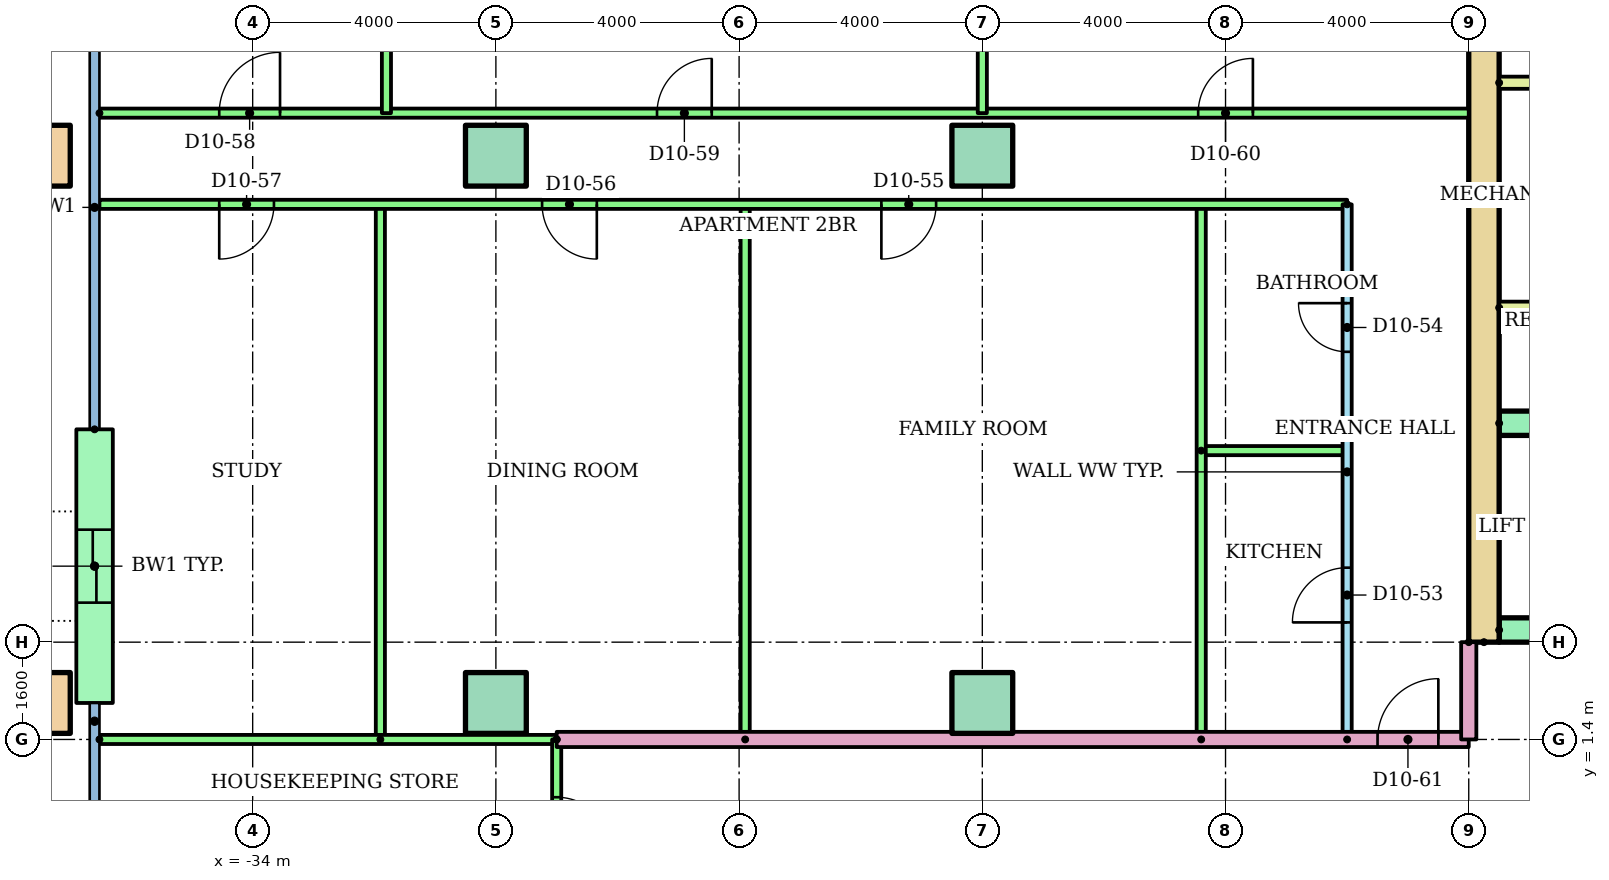
"""IFC4 building model, lengths in metres.
Left out: names, types, materials, properties, quantities, classifications, styles, units other than length and angle.
Written with IfcOpenShell. Run it as: python <this file> out.ifc"""

import sys

from ifc_helpers import new_model, si_unit, direction, frame, frame_2d, origin, origin_2d, place, context, subcontext, project, spatial, rectangle, hollow_rectangle, extrude, element, fill, save


model = new_model("IFC4")
c1 = context("Model", 3, precision=1e-05, world=origin(), true_north=direction((0.0, 1.0)))
c2 = subcontext(c1, "Body", "Model", "MODEL_VIEW")
j1 = project(units=[si_unit("LENGTHUNIT", "METRE"), si_unit("PLANEANGLEUNIT", "RADIAN")], contexts=[c1])
p1 = place(None, origin())
s1 = spatial("IfcSite", under=j1, at=p1, CompositionType="ELEMENT")
p2 = place(p1, origin())
s2 = spatial("IfcBuilding", under=s1, at=p2, CompositionType="ELEMENT")
p3 = place(p2, frame((0.0, 0.0, 41.6)))
s3 = spatial("IfcBuildingStorey", under=s2, at=p3, CompositionType="ELEMENT", Elevation=41.6)
p4 = place(p3, frame((-37.5, 2.0, 0.0)))
e1 = element("IfcColumn", 1, at=p4, inside=s3, PredefinedType="COLUMN", context=c2, shape_type="SweptSolid", body=[
    extrude(hollow_rectangle(XDim=1.0, YDim=1.0, WallThickness=0.05, at=origin_2d()), origin(), (0.0, 0.0, 1.0), 3.2),
])
for number, where in (
    (2, (-30.0, 2.0, 0.0)),
    (3, (-22.0, 2.0, 0.0)),
):
    element("IfcColumn", number, at=place(p3, frame(where)), inside=s3, PredefinedType="COLUMN", context=c2, shape_type="SweptSolid", body=[
        extrude(rectangle(XDim=1.0, YDim=1.0, at=origin_2d()), origin(), (0.0, 0.0, 1.0), 3.2),
    ])
p5 = place(p3, frame((-37.5, 11.0, 0.0)))
e4 = element("IfcColumn", 4, at=p5, inside=s3, PredefinedType="COLUMN", context=c2, shape_type="SweptSolid", body=[
    extrude(hollow_rectangle(XDim=1.0, YDim=1.0, WallThickness=0.05, at=origin_2d()), origin(), (0.0, 0.0, 1.0), 3.2),
])
for number, where in (
    (5, (-30.0, 11.0, 0.0)),
    (6, (-22.0, 11.0, 0.0)),
):
    element("IfcColumn", number, at=place(p3, frame(where)), inside=s3, PredefinedType="COLUMN", context=c2, shape_type="SweptSolid", body=[
        extrude(rectangle(XDim=1.0, YDim=1.0, at=origin_2d()), origin(), (0.0, 0.0, 1.0), 3.2),
    ])
p6 = place(p3, frame((-36.6, 6.5, 0.0), z_axis=(0.0, 0.0, 1.0), x_axis=(0.0, -1.0, 0.0)))
e7 = element("IfcWall", 7, at=p6, inside=s3, PredefinedType="STANDARD", context=c2, shape_type="SweptSolid", body=[
    extrude(rectangle(XDim=4.5, YDim=0.6, at=frame_2d((2.25, 0.0))), origin(), (0.0, 0.0, 1.0), 2.92),
])
p7 = place(p6, frame((1.65, 0.0, 0.0)))
e8 = element("IfcOpeningElement", 8, at=p7, cuts=e7, PredefinedType="OPENING", context=c2, shape_type="SweptSolid", body=[
    extrude(rectangle(XDim=1.2, YDim=2.1, at=frame_2d((0.6, 1.05))), frame((0.0, 0.31, 0.0), z_axis=(0.0, -1.0, 0.0), x_axis=(1.0, 0.0, 0.0)), (0.0, 0.0, 1.0), 0.62),
])
p8 = place(p3, frame((-13.75, 3.0, 0.0), z_axis=(0.0, 0.0, 1.0), x_axis=(0.0, 1.0, 0.0)))
e9 = element("IfcWall", 9, at=p8, inside=s3, PredefinedType="SHEAR", context=c2, shape_type="SweptSolid", body=[
    extrude(rectangle(XDim=17.0, YDim=0.5, at=frame_2d((8.5, 0.0))), origin(), (0.0, 0.0, 1.0), 2.92),
])
p9 = place(p3, frame((-13.5, 3.2, 0.0)))
e10 = element("IfcWall", 10, at=p9, inside=s3, PredefinedType="SHEAR", context=c2, shape_type="SweptSolid", body=[
    extrude(rectangle(XDim=27.0, YDim=0.4, at=frame_2d((13.5, 0.0))), origin(), (0.0, 0.0, 1.0), 2.92),
])
p10 = place(p9, frame((6.861, 0.0, 0.0)))
e11 = element("IfcOpeningElement", 11, at=p10, cuts=e10, PredefinedType="OPENING", context=c2, shape_type="SweptSolid", body=[
    extrude(rectangle(XDim=1.1, YDim=2.1, at=frame_2d((0.55, 1.05))), frame((0.0, 0.21, 0.0), z_axis=(0.0, -1.0, 0.0), x_axis=(1.0, 0.0, 0.0)), (0.0, 0.0, 1.0), 0.42),
])
p11 = place(p9, frame((9.906, 0.0, 0.0)))
e12 = element("IfcOpeningElement", 12, at=p11, cuts=e10, PredefinedType="OPENING", context=c2, shape_type="SweptSolid", body=[
    extrude(rectangle(XDim=1.1, YDim=2.1, at=frame_2d((0.55, 1.05))), frame((0.0, 0.21, 0.0), z_axis=(0.0, -1.0, 0.0), x_axis=(1.0, 0.0, 0.0)), (0.0, 0.0, 1.0), 0.42),
])
p12 = place(p9, frame((15.994, 0.0, 0.0)))
e13 = element("IfcOpeningElement", 13, at=p12, cuts=e10, PredefinedType="OPENING", context=c2, shape_type="SweptSolid", body=[
    extrude(rectangle(XDim=1.1, YDim=2.1, at=frame_2d((0.55, 1.05))), frame((0.0, 0.21, 0.0), z_axis=(0.0, -1.0, 0.0), x_axis=(1.0, 0.0, 0.0)), (0.0, 0.0, 1.0), 0.42),
])
p13 = place(p9, frame((19.039, 0.0, 0.0)))
e14 = element("IfcOpeningElement", 14, at=p13, cuts=e10, PredefinedType="OPENING", context=c2, shape_type="SweptSolid", body=[
    extrude(rectangle(XDim=1.1, YDim=2.1, at=frame_2d((0.55, 1.05))), frame((0.0, 0.21, 0.0), z_axis=(0.0, -1.0, 0.0), x_axis=(1.0, 0.0, 0.0)), (0.0, 0.0, 1.0), 0.42),
])
p14 = place(p9, frame((12.6, 0.0, 0.0)))
e15 = element("IfcOpeningElement", 15, at=p14, cuts=e10, PredefinedType="OPENING", context=c2, shape_type="SweptSolid", body=[
    extrude(rectangle(XDim=1.8, YDim=2.1, at=frame_2d((0.9, 1.05))), frame((0.0, 0.21, 0.0), z_axis=(0.0, -1.0, 0.0), x_axis=(1.0, 0.0, 0.0)), (0.0, 0.0, 1.0), 0.42),
])
p15 = place(p3, frame((-13.5, 6.6, 0.0)))
e16 = element("IfcWall", 16, at=p15, inside=s3, PredefinedType="SHEAR", context=c2, shape_type="SweptSolid", body=[
    extrude(rectangle(XDim=11.978, YDim=0.4, at=frame_2d((5.989, 0.0))), origin(), (0.0, 0.0, 1.0), 2.92),
])
for number, where in (
    (17, (-13.5, 8.5, 0.0)),
    (18, (-13.5, 12.2, 0.0)),
):
    element("IfcWall", number, at=place(p3, frame(where)), inside=s3, PredefinedType="PARTITIONING", context=c2, shape_type="SweptSolid", body=[
        extrude(rectangle(XDim=3.9, YDim=0.2, at=frame_2d((1.95, 0.0))), origin(), (0.0, 0.0, 1.0), 2.92),
    ])
p16 = place(p3, frame((-16.0, 1.4, 0.0), z_axis=(0.0, 0.0, 1.0), x_axis=(0.0, 1.0, 0.0)))
e19 = element("IfcWall", 19, at=p16, inside=s3, PredefinedType="PARTITIONING", context=c2, shape_type="SweptSolid", body=[
    extrude(rectangle(XDim=8.8, YDim=0.15, at=frame_2d((4.4, 0.0))), origin(), (0.0, 0.0, 1.0), 2.4),
])
p17 = place(p16, frame((1.925, 0.0, 0.0)))
e20 = element("IfcOpeningElement", 20, at=p17, cuts=e19, PredefinedType="OPENING", context=c2, shape_type="SweptSolid", body=[
    extrude(rectangle(XDim=0.9, YDim=2.1, at=frame_2d((0.45, 1.05))), frame((0.0, 0.085, 0.0), z_axis=(0.0, -1.0, 0.0), x_axis=(1.0, 0.0, 0.0)), (0.0, 0.0, 1.0), 0.17),
])
p18 = place(p16, frame((6.375, 0.0, 0.0)))
e21 = element("IfcOpeningElement", 21, at=p18, cuts=e19, PredefinedType="OPENING", context=c2, shape_type="SweptSolid", body=[
    extrude(rectangle(XDim=0.8, YDim=2.1, at=frame_2d((0.4, 1.05))), frame((0.0, 0.085, 0.0), z_axis=(0.0, -1.0, 0.0), x_axis=(1.0, 0.0, 0.0)), (0.0, 0.0, 1.0), 0.17),
])
p19 = place(p3, frame((-18.4, 6.15, 0.0)))
e22 = element("IfcWall", 22, at=p19, inside=s3, PredefinedType="PARTITIONING", context=c2, shape_type="SweptSolid", body=[
    extrude(rectangle(XDim=2.4, YDim=0.15, at=frame_2d((1.2, 0.0))), origin(), (0.0, 0.0, 1.0), 2.4),
])
for number, where, z_axis, x_axis in (
    (23, (-18.4, 1.4, 0.0), (0.0, 0.0, 1.0), (0.0, 1.0, 0.0)),
    (24, (-25.9, 1.4, 0.0), (0.0, 0.0, 1.0), (0.0, 1.0, 0.0)),
    (25, (-31.9, 1.4, 0.0), (0.0, 0.0, 1.0), (0.0, 1.0, 0.0)),
):
    element("IfcWall", number, at=place(p3, frame(where, z_axis=z_axis, x_axis=x_axis)), inside=s3, PredefinedType="PARTITIONING", context=c2, shape_type="SweptSolid", body=[
        extrude(rectangle(XDim=8.8, YDim=0.15, at=frame_2d((4.4, 0.0))), origin(), (0.0, 0.0, 1.0), 2.4),
    ])
p20 = place(p3, frame((-16.0, 10.2, 0.0), z_axis=(0.0, 0.0, 1.0), x_axis=(-1.0, 0.0, 0.0)))
e26 = element("IfcWall", 26, at=p20, inside=s3, PredefinedType="PARTITIONING", context=c2, shape_type="SweptSolid", body=[
    extrude(rectangle(XDim=20.52, YDim=0.15, at=frame_2d((10.26, 0.0))), origin(), (0.0, 0.0, 1.0), 2.4),
])
p21 = place(p20, frame((6.76, 0.0, 0.0)))
e27 = element("IfcOpeningElement", 27, at=p21, cuts=e26, PredefinedType="OPENING", context=c2, shape_type="SweptSolid", body=[
    extrude(rectangle(XDim=0.9, YDim=2.1, at=frame_2d((0.45, 1.05))), frame((0.0, 0.085, 0.0), z_axis=(0.0, -1.0, 0.0), x_axis=(1.0, 0.0, 0.0)), (0.0, 0.0, 1.0), 0.17),
])
p22 = place(p20, frame((12.34, 0.0, 0.0)))
e28 = element("IfcOpeningElement", 28, at=p22, cuts=e26, PredefinedType="OPENING", context=c2, shape_type="SweptSolid", body=[
    extrude(rectangle(XDim=0.9, YDim=2.1, at=frame_2d((0.45, 1.05))), frame((0.0, 0.085, 0.0), z_axis=(0.0, -1.0, 0.0), x_axis=(1.0, 0.0, 0.0)), (0.0, 0.0, 1.0), 0.17),
])
p23 = place(p20, frame((17.65, 0.0, 0.0)))
e29 = element("IfcOpeningElement", 29, at=p23, cuts=e26, PredefinedType="OPENING", context=c2, shape_type="SweptSolid", body=[
    extrude(rectangle(XDim=0.9, YDim=2.1, at=frame_2d((0.45, 1.05))), frame((0.0, 0.085, 0.0), z_axis=(0.0, -1.0, 0.0), x_axis=(1.0, 0.0, 0.0)), (0.0, 0.0, 1.0), 0.17),
])
p24 = place(p3, frame((-36.52, 11.7, 0.0)))
e30 = element("IfcWall", 30, at=p24, inside=s3, PredefinedType="PARTITIONING", context=c2, shape_type="SweptSolid", body=[
    extrude(rectangle(XDim=22.52, YDim=0.15, at=frame_2d((11.26, 0.0))), origin(), (0.0, 0.0, 1.0), 2.4),
])
p25 = place(p24, frame((1.97, 0.0, 0.0)))
e31 = element("IfcOpeningElement", 31, at=p25, cuts=e30, PredefinedType="OPENING", context=c2, shape_type="SweptSolid", body=[
    extrude(rectangle(XDim=1.0, YDim=2.1, at=frame_2d((0.5, 1.05))), frame((0.0, 0.085, 0.0), z_axis=(0.0, -1.0, 0.0), x_axis=(1.0, 0.0, 0.0)), (0.0, 0.0, 1.0), 0.17),
])
p26 = place(p24, frame((9.17, 0.0, 0.0)))
e32 = element("IfcOpeningElement", 32, at=p26, cuts=e30, PredefinedType="OPENING", context=c2, shape_type="SweptSolid", body=[
    extrude(rectangle(XDim=0.9, YDim=2.1, at=frame_2d((0.45, 1.05))), frame((0.0, 0.085, 0.0), z_axis=(0.0, -1.0, 0.0), x_axis=(1.0, 0.0, 0.0)), (0.0, 0.0, 1.0), 0.17),
])
p27 = place(p24, frame((18.07, 0.0, 0.0)))
e33 = element("IfcOpeningElement", 33, at=p27, cuts=e30, PredefinedType="OPENING", context=c2, shape_type="SweptSolid", body=[
    extrude(rectangle(XDim=0.9, YDim=2.1, at=frame_2d((0.45, 1.05))), frame((0.0, 0.085, 0.0), z_axis=(0.0, -1.0, 0.0), x_axis=(1.0, 0.0, 0.0)), (0.0, 0.0, 1.0), 0.17),
])
p28 = place(p3, frame((-31.8, 16.72, 0.0), z_axis=(0.0, 0.0, 1.0), x_axis=(0.0, -1.0, 0.0)))
e34 = element("IfcWall", 34, at=p28, inside=s3, PredefinedType="PARTITIONING", context=c2, shape_type="SweptSolid", body=[
    extrude(rectangle(XDim=5.02, YDim=0.15, at=frame_2d((2.51, 0.0))), origin(), (0.0, 0.0, 1.0), 2.4),
])
p29 = place(p3, frame((-22.0, 18.521, 0.0), z_axis=(0.0, 0.0, 1.0), x_axis=(0.0, -1.0, 0.0)))
e35 = element("IfcWall", 35, at=p29, inside=s3, PredefinedType="PARTITIONING", context=c2, shape_type="SweptSolid", body=[
    extrude(rectangle(XDim=6.821, YDim=0.15, at=frame_2d((3.411, 0.0))), origin(), (0.0, 0.0, 1.0), 2.4),
])
p30 = place(p3, frame((-29.0, 1.4, 0.0)))
e36 = element("IfcWall", 36, at=p30, inside=s3, PredefinedType="PARTITIONING", context=c2, shape_type="SweptSolid", body=[
    extrude(rectangle(XDim=15.0, YDim=0.25, at=frame_2d((7.5, 0.0))), origin(), (0.0, 0.0, 1.0), 2.4),
])
p31 = place(p30, frame((13.5, 0.0, 0.0)))
e37 = element("IfcOpeningElement", 37, at=p31, cuts=e36, PredefinedType="OPENING", context=c2, shape_type="SweptSolid", body=[
    extrude(rectangle(XDim=1.0, YDim=2.1, at=frame_2d((0.5, 1.05))), frame((0.0, 0.135, 0.0), z_axis=(0.0, -1.0, 0.0), x_axis=(1.0, 0.0, 0.0)), (0.0, 0.0, 1.0), 0.27),
])
p32 = place(p3, frame((-36.52, 1.4, 0.0)))
e38 = element("IfcWall", 38, at=p32, inside=s3, PredefinedType="PARTITIONING", context=c2, shape_type="SweptSolid", body=[
    extrude(rectangle(XDim=7.52, YDim=0.15, at=frame_2d((3.76, 0.0))), origin(), (0.0, 0.0, 1.0), 2.4),
])
p33 = place(p3, frame((-29.0, 1.4, 0.0), z_axis=(0.0, 0.0, 1.0), x_axis=(0.0, -1.0, 0.0)))
e39 = element("IfcWall", 39, at=p33, inside=s3, PredefinedType="PARTITIONING", context=c2, shape_type="SweptSolid", body=[
    extrude(rectangle(XDim=2.8, YDim=0.15, at=frame_2d((1.4, 0.0))), origin(), (0.0, 0.0, 1.0), 2.4),
])
p34 = place(p33, frame((0.95, 0.0, 0.0)))
e40 = element("IfcOpeningElement", 40, at=p34, cuts=e39, PredefinedType="OPENING", context=c2, shape_type="SweptSolid", body=[
    extrude(rectangle(XDim=0.9, YDim=2.1, at=frame_2d((0.45, 1.05))), frame((0.0, 0.085, 0.0), z_axis=(0.0, -1.0, 0.0), x_axis=(1.0, 0.0, 0.0)), (0.0, 0.0, 1.0), 0.17),
])
p35 = place(p3, frame((-14.0, 3.0, 0.0), z_axis=(0.0, 0.0, 1.0), x_axis=(0.0, -1.0, 0.0)))
e41 = element("IfcWall", 41, at=p35, inside=s3, PredefinedType="PARTITIONING", context=c2, shape_type="SweptSolid", body=[
    extrude(rectangle(XDim=1.6, YDim=0.25, at=frame_2d((0.8, 0.0))), origin(), (0.0, 0.0, 1.0), 2.4),
])
p36 = place(p17, origin())
e42 = element("IfcDoor", 42, at=p36, inside=s3, OperationType="SINGLE_SWING_LEFT", PredefinedType="DOOR", context=c2, shape_type="SweptSolid", body=[
    extrude(rectangle(XDim=0.9, YDim=2.1, at=frame_2d((0.45, 1.05))), frame((0.0, 0.025, 0.0), z_axis=(0.0, -1.0, 0.0), x_axis=(1.0, 0.0, 0.0)), (0.0, 0.0, 1.0), 0.05),
])
fill(e20, e42)
p37 = place(p18, origin())
e43 = element("IfcDoor", 43, at=p37, inside=s3, OperationType="SINGLE_SWING_RIGHT", PredefinedType="DOOR", context=c2, shape_type="SweptSolid", body=[
    extrude(rectangle(XDim=0.8, YDim=2.1, at=frame_2d((0.4, 1.05))), frame((0.0, 0.025, 0.0), z_axis=(0.0, -1.0, 0.0), x_axis=(1.0, 0.0, 0.0)), (0.0, 0.0, 1.0), 0.05),
])
fill(e21, e43)
p38 = place(p21, origin())
e44 = element("IfcDoor", 44, at=p38, inside=s3, OperationType="SINGLE_SWING_RIGHT", PredefinedType="DOOR", context=c2, shape_type="SweptSolid", body=[
    extrude(rectangle(XDim=0.9, YDim=2.1, at=frame_2d((0.45, 1.05))), frame((0.0, 0.025, 0.0), z_axis=(0.0, -1.0, 0.0), x_axis=(1.0, 0.0, 0.0)), (0.0, 0.0, 1.0), 0.05),
])
fill(e27, e44)
p39 = place(p22, origin())
e45 = element("IfcDoor", 45, at=p39, inside=s3, OperationType="SINGLE_SWING_LEFT", PredefinedType="DOOR", context=c2, shape_type="SweptSolid", body=[
    extrude(rectangle(XDim=0.9, YDim=2.1, at=frame_2d((0.45, 1.05))), frame((0.0, 0.025, 0.0), z_axis=(0.0, -1.0, 0.0), x_axis=(1.0, 0.0, 0.0)), (0.0, 0.0, 1.0), 0.05),
])
fill(e28, e45)
p40 = place(p23, origin())
e46 = element("IfcDoor", 46, at=p40, inside=s3, OperationType="SINGLE_SWING_RIGHT", PredefinedType="DOOR", context=c2, shape_type="SweptSolid", body=[
    extrude(rectangle(XDim=0.9, YDim=2.1, at=frame_2d((0.45, 1.05))), frame((0.0, 0.025, 0.0), z_axis=(0.0, -1.0, 0.0), x_axis=(1.0, 0.0, 0.0)), (0.0, 0.0, 1.0), 0.05),
])
fill(e29, e46)
p41 = place(p25, origin())
e47 = element("IfcDoor", 47, at=p41, inside=s3, OperationType="SINGLE_SWING_RIGHT", PredefinedType="DOOR", context=c2, shape_type="SweptSolid", body=[
    extrude(rectangle(XDim=1.0, YDim=2.1, at=frame_2d((0.5, 1.05))), frame((0.0, 0.025, 0.0), z_axis=(0.0, -1.0, 0.0), x_axis=(1.0, 0.0, 0.0)), (0.0, 0.0, 1.0), 0.05),
])
fill(e31, e47)
p42 = place(p26, origin())
e48 = element("IfcDoor", 48, at=p42, inside=s3, OperationType="SINGLE_SWING_RIGHT", PredefinedType="DOOR", context=c2, shape_type="SweptSolid", body=[
    extrude(rectangle(XDim=0.9, YDim=2.1, at=frame_2d((0.45, 1.05))), frame((0.0, 0.025, 0.0), z_axis=(0.0, -1.0, 0.0), x_axis=(1.0, 0.0, 0.0)), (0.0, 0.0, 1.0), 0.05),
])
fill(e32, e48)
p43 = place(p27, origin())
e49 = element("IfcDoor", 49, at=p43, inside=s3, OperationType="SINGLE_SWING_RIGHT", PredefinedType="DOOR", context=c2, shape_type="SweptSolid", body=[
    extrude(rectangle(XDim=0.9, YDim=2.1, at=frame_2d((0.45, 1.05))), frame((0.0, 0.025, 0.0), z_axis=(0.0, -1.0, 0.0), x_axis=(1.0, 0.0, 0.0)), (0.0, 0.0, 1.0), 0.05),
])
fill(e33, e49)
p44 = place(p31, origin())
e50 = element("IfcDoor", 50, at=p44, inside=s3, OperationType="SINGLE_SWING_RIGHT", PredefinedType="DOOR", context=c2, shape_type="SweptSolid", body=[
    extrude(rectangle(XDim=1.0, YDim=2.1, at=frame_2d((0.5, 1.05))), frame((0.0, 0.025, 0.0), z_axis=(0.0, -1.0, 0.0), x_axis=(1.0, 0.0, 0.0)), (0.0, 0.0, 1.0), 0.05),
])
fill(e37, e50)
p45 = place(p34, origin())
e51 = element("IfcDoor", 51, at=p45, inside=s3, OperationType="SINGLE_SWING_RIGHT", PredefinedType="DOOR", context=c2, shape_type="SweptSolid", body=[
    extrude(rectangle(XDim=0.9, YDim=2.1, at=frame_2d((0.45, 1.05))), frame((0.0, 0.025, 0.0), z_axis=(0.0, -1.0, 0.0), x_axis=(1.0, 0.0, 0.0)), (0.0, 0.0, 1.0), 0.05),
])
fill(e40, e51)
p46 = place(p7, origin())
e52 = element("IfcDoor", 52, at=p46, inside=s3, OperationType="SLIDING_TO_LEFT", PredefinedType="DOOR", context=c2, shape_type="SweptSolid", body=[
    extrude(rectangle(XDim=1.2, YDim=2.1, at=frame_2d((0.6, 1.05))), frame((0.0, 0.025, 0.0), z_axis=(0.0, -1.0, 0.0), x_axis=(1.0, 0.0, 0.0)), (0.0, 0.0, 1.0), 0.05),
])
fill(e8, e52)
save(model, sys.argv[1])
